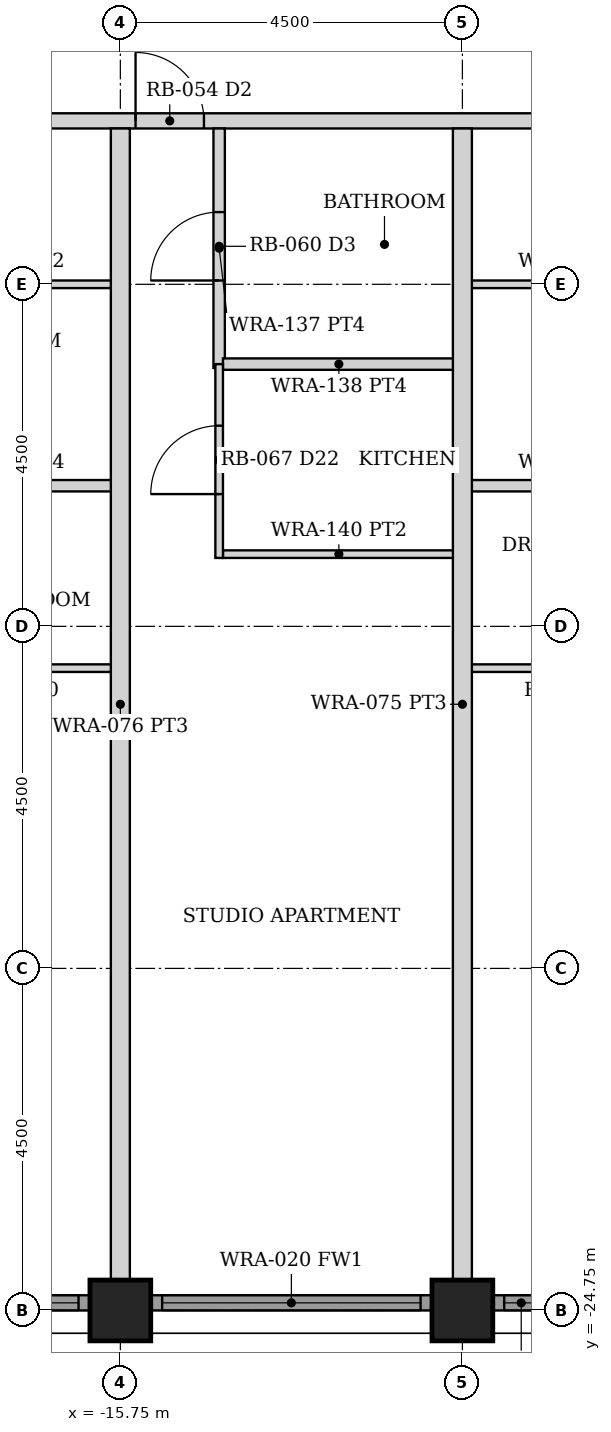
"""IFC4 building model, lengths in metres.
Left out: names, types, materials, properties, quantities, classifications, styles, units other than length and angle.
Written with IfcOpenShell. Run it as: python <this file> out.ifc"""

import sys

from ifc_helpers import new_model, si_unit, direction, frame, frame_2d, origin, origin_2d, place, context, subcontext, project, spatial, rectangle, hollow_rectangle, extrude, element, fill, save


model = new_model("IFC4")
c1 = context("Model", 3, precision=1e-05, world=origin(), true_north=direction((0.0, 1.0)))
c2 = subcontext(c1, "Body", "Model", "MODEL_VIEW")
j1 = project(units=[si_unit("LENGTHUNIT", "METRE"), si_unit("PLANEANGLEUNIT", "RADIAN")], contexts=[c1])
p1 = place(None, origin())
s1 = spatial("IfcSite", under=j1, at=p1, CompositionType="ELEMENT")
p2 = place(p1, origin())
s2 = spatial("IfcBuilding", under=s1, at=p2, CompositionType="ELEMENT")
p3 = place(p2, frame((0.0, 0.0, 37.0)))
s3 = spatial("IfcBuildingStorey", under=s2, at=p3, CompositionType="ELEMENT", Elevation=37.0)
for number, where, z_axis, x_axis in (
    (1, (-15.75, -24.75, 0.0), (0.0, 0.0, 1.0), (0.0, 1.0, 0.0)),
    (2, (-11.25, -24.75, 0.0), (0.0, 0.0, 1.0), (0.0, 1.0, 0.0)),
):
    element("IfcColumn", number, at=place(p3, frame(where, z_axis=z_axis, x_axis=x_axis)), inside=s3, PredefinedType="COLUMN", context=c2, shape_type="SweptSolid", body=[
        extrude(hollow_rectangle(XDim=0.8, YDim=0.8, WallThickness=0.07, at=origin_2d()), origin(), (0.0, 0.0, 1.0), 3.5),
    ])
p4 = place(p3, frame((-19.845, -24.65, 0.0), z_axis=(0.0, 0.0, 1.0), x_axis=(1.0, 0.0, 0.0)))
e3 = element("IfcWall", 3, at=p4, inside=s3, PredefinedType="SOLIDWALL", context=c2, shape_type="SweptSolid", body=[
    extrude(rectangle(XDim=3.69, YDim=0.2, at=frame_2d((1.845, 0.0))), origin(), (0.0, 0.0, 1.0), 2.379),
])
p5 = place(p4, frame((0.145, 0.0, 0.3)))
e4 = element("IfcOpeningElement", 4, at=p5, cuts=e3, PredefinedType="OPENING", context=c2, shape_type="SweptSolid", body=[
    extrude(rectangle(XDim=3.4, YDim=1.929, at=frame_2d((1.7, 0.964))), frame((0.0, 0.11, 0.0), z_axis=(0.0, -1.0, 0.0), x_axis=(1.0, 0.0, 0.0)), (0.0, 0.0, 1.0), 0.22),
])
p6 = place(p3, frame((-15.345, -24.65, 0.0), z_axis=(0.0, 0.0, 1.0), x_axis=(1.0, 0.0, 0.0)))
e5 = element("IfcWall", 5, at=p6, inside=s3, PredefinedType="SOLIDWALL", context=c2, shape_type="SweptSolid", body=[
    extrude(rectangle(XDim=3.69, YDim=0.2, at=frame_2d((1.845, 0.0))), origin(), (0.0, 0.0, 1.0), 2.379),
])
p7 = place(p6, frame((0.145, 0.0, 0.3)))
e6 = element("IfcOpeningElement", 6, at=p7, cuts=e5, PredefinedType="OPENING", context=c2, shape_type="SweptSolid", body=[
    extrude(rectangle(XDim=3.4, YDim=1.929, at=frame_2d((1.7, 0.964))), frame((0.0, 0.11, 0.0), z_axis=(0.0, -1.0, 0.0), x_axis=(1.0, 0.0, 0.0)), (0.0, 0.0, 1.0), 0.22),
])
p8 = place(p3, frame((-10.845, -24.65, 0.0), z_axis=(0.0, 0.0, 1.0), x_axis=(1.0, 0.0, 0.0)))
e7 = element("IfcWall", 7, at=p8, inside=s3, PredefinedType="SOLIDWALL", context=c2, shape_type="SweptSolid", body=[
    extrude(rectangle(XDim=3.69, YDim=0.2, at=frame_2d((1.845, 0.0))), origin(), (0.0, 0.0, 1.0), 2.379),
])
p9 = place(p8, frame((0.145, 0.0, 0.3)))
e8 = element("IfcOpeningElement", 8, at=p9, cuts=e7, PredefinedType="OPENING", context=c2, shape_type="SweptSolid", body=[
    extrude(rectangle(XDim=3.4, YDim=1.929, at=frame_2d((1.7, 0.964))), frame((0.0, 0.11, 0.0), z_axis=(0.0, -1.0, 0.0), x_axis=(1.0, 0.0, 0.0)), (0.0, 0.0, 1.0), 0.22),
])
p10 = place(p3, frame((-24.55, -9.1, 0.0), z_axis=(0.0, 0.0, 1.0), x_axis=(1.0, 0.0, 0.0)))
e9 = element("IfcWall", 9, at=p10, inside=s3, PredefinedType="PARTITIONING", context=c2, shape_type="SweptSolid", body=[
    extrude(rectangle(XDim=49.1, YDim=0.2, at=frame_2d((24.55, 0.0))), origin(), (0.0, 0.0, 1.0), 2.373),
])
p11 = place(p10, frame((5.1, 0.0, 0.0)))
e10 = element("IfcOpeningElement", 10, at=p11, cuts=e9, PredefinedType="OPENING", context=c2, shape_type="SweptSolid", body=[
    extrude(rectangle(XDim=0.9, YDim=2.1, at=frame_2d((0.45, 1.05))), frame((0.0, 0.11, 0.0), z_axis=(0.0, -1.0, 0.0), x_axis=(1.0, 0.0, 0.0)), (0.0, 0.0, 1.0), 0.22),
])
p12 = place(p10, frame((9.0, 0.0, 0.0)))
e11 = element("IfcOpeningElement", 11, at=p12, cuts=e9, PredefinedType="OPENING", context=c2, shape_type="SweptSolid", body=[
    extrude(rectangle(XDim=0.9, YDim=2.1, at=frame_2d((0.45, 1.05))), frame((0.0, 0.11, 0.0), z_axis=(0.0, -1.0, 0.0), x_axis=(1.0, 0.0, 0.0)), (0.0, 0.0, 1.0), 0.22),
])
p13 = place(p10, frame((18.1, 0.0, 0.0)))
e12 = element("IfcOpeningElement", 12, at=p13, cuts=e9, PredefinedType="OPENING", context=c2, shape_type="SweptSolid", body=[
    extrude(rectangle(XDim=0.9, YDim=2.1, at=frame_2d((0.45, 1.05))), frame((0.0, 0.11, 0.0), z_axis=(0.0, -1.0, 0.0), x_axis=(1.0, 0.0, 0.0)), (0.0, 0.0, 1.0), 0.22),
])
p14 = place(p10, frame((22.5, 0.0, 0.0)))
e13 = element("IfcOpeningElement", 13, at=p14, cuts=e9, PredefinedType="OPENING", context=c2, shape_type="SweptSolid", body=[
    extrude(rectangle(XDim=0.9, YDim=2.1, at=frame_2d((0.45, 1.05))), frame((0.0, 0.11, 0.0), z_axis=(0.0, -1.0, 0.0), x_axis=(1.0, 0.0, 0.0)), (0.0, 0.0, 1.0), 0.22),
])
p15 = place(p10, frame((27.1, 0.0, 0.0)))
e14 = element("IfcOpeningElement", 14, at=p15, cuts=e9, PredefinedType="OPENING", context=c2, shape_type="SweptSolid", body=[
    extrude(rectangle(XDim=0.9, YDim=2.1, at=frame_2d((0.45, 1.05))), frame((0.0, 0.11, 0.0), z_axis=(0.0, -1.0, 0.0), x_axis=(1.0, 0.0, 0.0)), (0.0, 0.0, 1.0), 0.22),
])
p16 = place(p10, frame((36.0, 0.0, 0.0)))
e15 = element("IfcOpeningElement", 15, at=p16, cuts=e9, PredefinedType="OPENING", context=c2, shape_type="SweptSolid", body=[
    extrude(rectangle(XDim=0.9, YDim=2.1, at=frame_2d((0.45, 1.05))), frame((0.0, 0.11, 0.0), z_axis=(0.0, -1.0, 0.0), x_axis=(1.0, 0.0, 0.0)), (0.0, 0.0, 1.0), 0.22),
])
p17 = place(p10, frame((43.1, 0.0, 0.0)))
e16 = element("IfcOpeningElement", 16, at=p17, cuts=e9, PredefinedType="OPENING", context=c2, shape_type="SweptSolid", body=[
    extrude(rectangle(XDim=0.9, YDim=2.1, at=frame_2d((0.45, 1.05))), frame((0.0, 0.11, 0.0), z_axis=(0.0, -1.0, 0.0), x_axis=(1.0, 0.0, 0.0)), (0.0, 0.0, 1.0), 0.22),
])
p18 = place(p3, frame((-18.95, -11.25, 0.0), z_axis=(0.0, 0.0, 1.0), x_axis=(1.0, 0.0, 0.0)))
e17 = element("IfcWall", 17, at=p18, inside=s3, PredefinedType="PARTITIONING", context=c2, shape_type="SweptSolid", body=[
    extrude(rectangle(XDim=3.14, YDim=0.1, at=frame_2d((1.57, 0.0))), origin(), (0.0, 0.0, 1.0), 2.373),
])
p19 = place(p3, frame((-20.2, -16.3, 0.0), z_axis=(0.0, 0.0, 1.0), x_axis=(1.0, 0.0, 0.0)))
e18 = element("IfcWall", 18, at=p19, inside=s3, PredefinedType="PARTITIONING", context=c2, shape_type="SweptSolid", body=[
    extrude(rectangle(XDim=4.39, YDim=0.1, at=frame_2d((2.195, 0.0))), origin(), (0.0, 0.0, 1.0), 2.373),
])
p20 = place(p19, frame((0.175, 0.0, 0.0)))
e19 = element("IfcOpeningElement", 19, at=p20, cuts=e18, PredefinedType="OPENING", context=c2, shape_type="SweptSolid", body=[
    extrude(rectangle(XDim=0.85, YDim=2.1, at=frame_2d((0.425, 1.05))), frame((0.0, 0.06, 0.0), z_axis=(0.0, -1.0, 0.0), x_axis=(1.0, 0.0, 0.0)), (0.0, 0.0, 1.0), 0.12),
])
p21 = place(p19, frame((2.46, 0.0, 0.0)))
e20 = element("IfcOpeningElement", 20, at=p21, cuts=e18, PredefinedType="OPENING", context=c2, shape_type="SweptSolid", body=[
    extrude(rectangle(XDim=0.8, YDim=2.1, at=frame_2d((0.4, 1.05))), frame((0.0, 0.06, 0.0), z_axis=(0.0, -1.0, 0.0), x_axis=(1.0, 0.0, 0.0)), (0.0, 0.0, 1.0), 0.12),
])
p22 = place(p3, frame((-18.95, -13.9, 0.0), z_axis=(0.0, 0.0, 1.0), x_axis=(1.0, 0.0, 0.0)))
e21 = element("IfcWall", 21, at=p22, inside=s3, PredefinedType="PARTITIONING", context=c2, shape_type="SweptSolid", body=[
    extrude(rectangle(XDim=3.14, YDim=0.15, at=frame_2d((1.57, 0.0))), origin(), (0.0, 0.0, 1.0), 2.373),
])
p23 = place(p3, frame((-14.45, -12.35, 0.0), z_axis=(0.0, 0.0, 1.0), x_axis=(0.0, 1.0, 0.0)))
e22 = element("IfcWall", 22, at=p23, inside=s3, PredefinedType="PARTITIONING", context=c2, shape_type="SweptSolid", body=[
    extrude(rectangle(XDim=3.15, YDim=0.15, at=frame_2d((1.575, 0.0))), origin(), (0.0, 0.0, 1.0), 2.373),
])
p24 = place(p23, frame((1.15, 0.0, 0.0)))
e23 = element("IfcOpeningElement", 23, at=p24, cuts=e22, PredefinedType="OPENING", context=c2, shape_type="SweptSolid", body=[
    extrude(rectangle(XDim=0.9, YDim=2.1, at=frame_2d((0.45, 1.05))), frame((0.0, 0.085, 0.0), z_axis=(0.0, -1.0, 0.0), x_axis=(1.0, 0.0, 0.0)), (0.0, 0.0, 1.0), 0.17),
])
p25 = place(p3, frame((-14.4, -12.3, 0.0), z_axis=(0.0, 0.0, 1.0), x_axis=(1.0, 0.0, 0.0)))
e24 = element("IfcWall", 24, at=p25, inside=s3, PredefinedType="PARTITIONING", context=c2, shape_type="SweptSolid", body=[
    extrude(rectangle(XDim=3.05, YDim=0.15, at=frame_2d((1.525, 0.0))), origin(), (0.0, 0.0, 1.0), 2.373),
])
p26 = place(p3, frame((-14.4, -14.8, 0.0), z_axis=(0.0, 0.0, 1.0), x_axis=(1.0, 0.0, 0.0)))
e25 = element("IfcWall", 25, at=p26, inside=s3, PredefinedType="PARTITIONING", context=c2, shape_type="SweptSolid", body=[
    extrude(rectangle(XDim=3.05, YDim=0.1, at=frame_2d((1.525, 0.0))), origin(), (0.0, 0.0, 1.0), 2.373),
])
p27 = place(p3, frame((-14.45, -14.85, 0.0), z_axis=(0.0, 0.0, 1.0), x_axis=(0.0, 1.0, 0.0)))
e26 = element("IfcWall", 26, at=p27, inside=s3, PredefinedType="PARTITIONING", context=c2, shape_type="SweptSolid", body=[
    extrude(rectangle(XDim=2.55, YDim=0.1, at=frame_2d((1.275, 0.0))), origin(), (0.0, 0.0, 1.0), 2.373),
])
p28 = place(p27, frame((0.84, 0.0, 0.0)))
e27 = element("IfcOpeningElement", 27, at=p28, cuts=e26, PredefinedType="OPENING", context=c2, shape_type="SweptSolid", body=[
    extrude(rectangle(XDim=0.9, YDim=2.1, at=frame_2d((0.45, 1.05))), frame((0.0, 0.06, 0.0), z_axis=(0.0, -1.0, 0.0), x_axis=(1.0, 0.0, 0.0)), (0.0, 0.0, 1.0), 0.12),
])
p29 = place(p3, frame((-11.19, -11.25, 0.0), z_axis=(0.0, 0.0, 1.0), x_axis=(1.0, 0.0, 0.0)))
e28 = element("IfcWall", 28, at=p29, inside=s3, PredefinedType="PARTITIONING", context=c2, shape_type="SweptSolid", body=[
    extrude(rectangle(XDim=3.14, YDim=0.1, at=frame_2d((1.57, 0.0))), origin(), (0.0, 0.0, 1.0), 2.373),
])
p30 = place(p3, frame((-11.19, -16.3, 0.0), z_axis=(0.0, 0.0, 1.0), x_axis=(1.0, 0.0, 0.0)))
e29 = element("IfcWall", 29, at=p30, inside=s3, PredefinedType="PARTITIONING", context=c2, shape_type="SweptSolid", body=[
    extrude(rectangle(XDim=4.39, YDim=0.1, at=frame_2d((2.195, 0.0))), origin(), (0.0, 0.0, 1.0), 2.373),
])
p31 = place(p30, frame((3.365, 0.0, 0.0)))
e30 = element("IfcOpeningElement", 30, at=p31, cuts=e29, PredefinedType="OPENING", context=c2, shape_type="SweptSolid", body=[
    extrude(rectangle(XDim=0.85, YDim=2.1, at=frame_2d((0.425, 1.05))), frame((0.0, 0.06, 0.0), z_axis=(0.0, -1.0, 0.0), x_axis=(1.0, 0.0, 0.0)), (0.0, 0.0, 1.0), 0.12),
])
p32 = place(p30, frame((1.13, 0.0, 0.0)))
e31 = element("IfcOpeningElement", 31, at=p32, cuts=e29, PredefinedType="OPENING", context=c2, shape_type="SweptSolid", body=[
    extrude(rectangle(XDim=0.8, YDim=2.1, at=frame_2d((0.4, 1.05))), frame((0.0, 0.06, 0.0), z_axis=(0.0, -1.0, 0.0), x_axis=(1.0, 0.0, 0.0)), (0.0, 0.0, 1.0), 0.12),
])
p33 = place(p3, frame((-11.19, -13.9, 0.0), z_axis=(0.0, 0.0, 1.0), x_axis=(1.0, 0.0, 0.0)))
e32 = element("IfcWall", 32, at=p33, inside=s3, PredefinedType="PARTITIONING", context=c2, shape_type="SweptSolid", body=[
    extrude(rectangle(XDim=3.14, YDim=0.15, at=frame_2d((1.57, 0.0))), origin(), (0.0, 0.0, 1.0), 2.373),
])
for number, where, z_axis, x_axis in (
    (33, (-15.75, -24.35, 0.0), (0.0, 0.0, 1.0), (0.0, 1.0, 0.0)),
    (34, (-11.25, -24.35, 0.0), (0.0, 0.0, 1.0), (0.0, 1.0, 0.0)),
):
    element("IfcWall", number, at=place(p3, frame(where, z_axis=z_axis, x_axis=x_axis)), inside=s3, PredefinedType="PARTITIONING", context=c2, shape_type="SweptSolid", body=[
        extrude(rectangle(XDim=15.15, YDim=0.25, at=frame_2d((7.575, 0.0))), origin(), (0.0, 0.0, 1.0), 2.373),
    ])
p34 = place(p5, origin())
e35 = element("IfcWindow", 35, at=p34, inside=s3, PartitioningType="SINGLE_PANEL", PredefinedType="WINDOW", context=c2, shape_type="SweptSolid", body=[
    extrude(rectangle(XDim=3.4, YDim=1.929, at=frame_2d((1.7, 0.964))), frame((0.0, 0.03, 0.0), z_axis=(0.0, -1.0, 0.0), x_axis=(1.0, 0.0, 0.0)), (0.0, 0.0, 1.0), 0.06),
])
fill(e4, e35)
p35 = place(p7, origin())
e36 = element("IfcWindow", 36, at=p35, inside=s3, PartitioningType="SINGLE_PANEL", PredefinedType="WINDOW", context=c2, shape_type="SweptSolid", body=[
    extrude(rectangle(XDim=3.4, YDim=1.929, at=frame_2d((1.7, 0.964))), frame((0.0, 0.03, 0.0), z_axis=(0.0, -1.0, 0.0), x_axis=(1.0, 0.0, 0.0)), (0.0, 0.0, 1.0), 0.06),
])
fill(e6, e36)
p36 = place(p9, origin())
e37 = element("IfcWindow", 37, at=p36, inside=s3, PartitioningType="SINGLE_PANEL", PredefinedType="WINDOW", context=c2, shape_type="SweptSolid", body=[
    extrude(rectangle(XDim=3.4, YDim=1.929, at=frame_2d((1.7, 0.964))), frame((0.0, 0.03, 0.0), z_axis=(0.0, -1.0, 0.0), x_axis=(1.0, 0.0, 0.0)), (0.0, 0.0, 1.0), 0.06),
])
fill(e8, e37)
p37 = place(p12, origin())
e38 = element("IfcDoor", 38, at=p37, inside=s3, OperationType="SINGLE_SWING_LEFT", PredefinedType="DOOR", context=c2, shape_type="SweptSolid", body=[
    extrude(rectangle(XDim=0.9, YDim=2.1, at=frame_2d((0.45, 1.05))), frame((0.0, 0.025, 0.0), z_axis=(0.0, -1.0, 0.0), x_axis=(1.0, 0.0, 0.0)), (0.0, 0.0, 1.0), 0.05),
])
fill(e11, e38)
p38 = place(p24, origin())
e39 = element("IfcDoor", 39, at=p38, inside=s3, OperationType="SINGLE_SWING_LEFT", PredefinedType="DOOR", context=c2, shape_type="SweptSolid", body=[
    extrude(rectangle(XDim=0.9, YDim=2.1, at=frame_2d((0.45, 1.05))), frame((0.0, 0.025, 0.0), z_axis=(0.0, -1.0, 0.0), x_axis=(1.0, 0.0, 0.0)), (0.0, 0.0, 1.0), 0.05),
])
fill(e23, e39)
p39 = place(p28, origin())
e40 = element("IfcDoor", 40, at=p39, inside=s3, OperationType="SINGLE_SWING_LEFT", PredefinedType="DOOR", context=c2, shape_type="SweptSolid", body=[
    extrude(rectangle(XDim=0.9, YDim=2.1, at=frame_2d((0.45, 1.05))), frame((0.0, 0.025, 0.0), z_axis=(0.0, -1.0, 0.0), x_axis=(1.0, 0.0, 0.0)), (0.0, 0.0, 1.0), 0.05),
])
fill(e27, e40)
save(model, sys.argv[1])
